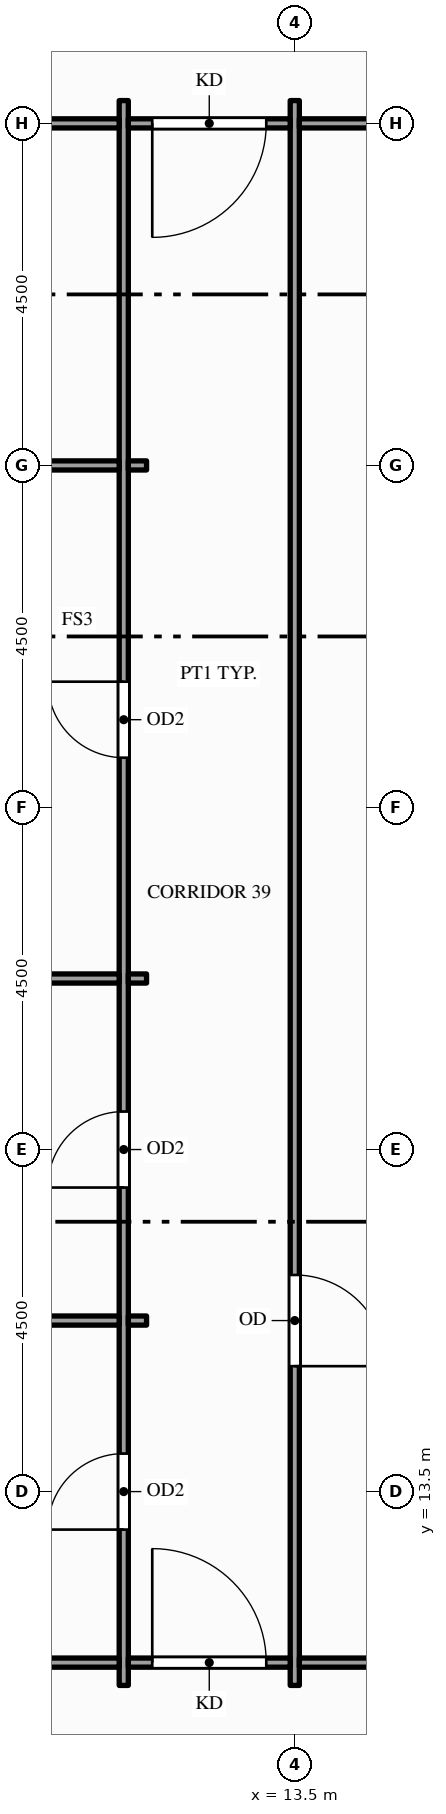
"""IFC4 building model, lengths in metres.
Left out: names, types, materials, properties, quantities, classifications, styles, units other than length and angle.
Written with IfcOpenShell. Run it as: python <this file> out.ifc"""

import sys

from ifc_helpers import new_model, si_unit, direction, frame, frame_2d, origin, place, context, subcontext, project, spatial, rectangle, extrude, element, fill, save


model = new_model("IFC4")
c1 = context("Model", 3, precision=1e-05, world=origin(), true_north=direction((0.0, 1.0)))
c2 = subcontext(c1, "Body", "Model", "MODEL_VIEW")
j1 = project(units=[si_unit("LENGTHUNIT", "METRE"), si_unit("PLANEANGLEUNIT", "RADIAN")], contexts=[c1])
p1 = place(None, origin())
s1 = spatial("IfcSite", under=j1, at=p1, CompositionType="ELEMENT")
p2 = place(p1, origin())
s2 = spatial("IfcBuilding", under=s1, at=p2, CompositionType="ELEMENT")
p3 = place(p2, frame((0.0, 0.0, 183.0)))
s3 = spatial("IfcBuildingStorey", under=s2, at=p3, CompositionType="ELEMENT", Elevation=183.0)
p4 = place(p3, frame((11.25, 10.95, 0.0), z_axis=(0.0, 0.0, 1.0), x_axis=(0.0, 1.0, 0.0)))
e1 = element("IfcWall", 1, at=p4, inside=s3, PredefinedType="PARTITIONING", context=c2, shape_type="SweptSolid", body=[
    extrude(rectangle(XDim=20.85, YDim=0.12, at=frame_2d((10.425, 0.0))), origin(), (0.0, 0.0, 1.0), 2.5),
])
p5 = place(p4, frame((2.05, 0.0, 0.0)))
e2 = element("IfcOpeningElement", 2, at=p5, cuts=e1, PredefinedType="OPENING", context=c2, shape_type="SweptSolid", body=[
    extrude(rectangle(XDim=1.0, YDim=2.1, at=frame_2d((0.5, 1.05))), frame((0.0, 0.07, 0.0), z_axis=(0.0, -1.0, 0.0), x_axis=(1.0, 0.0, 0.0)), (0.0, 0.0, 1.0), 0.14),
])
p6 = place(p4, frame((6.55, 0.0, 0.0)))
e3 = element("IfcOpeningElement", 3, at=p6, cuts=e1, PredefinedType="OPENING", context=c2, shape_type="SweptSolid", body=[
    extrude(rectangle(XDim=1.0, YDim=2.1, at=frame_2d((0.5, 1.05))), frame((0.0, 0.07, 0.0), z_axis=(0.0, -1.0, 0.0), x_axis=(1.0, 0.0, 0.0)), (0.0, 0.0, 1.0), 0.14),
])
p7 = place(p4, frame((12.205, 0.0, 0.0)))
e4 = element("IfcOpeningElement", 4, at=p7, cuts=e1, PredefinedType="OPENING", context=c2, shape_type="SweptSolid", body=[
    extrude(rectangle(XDim=1.0, YDim=2.1, at=frame_2d((0.5, 1.05))), frame((0.0, 0.07, 0.0), z_axis=(0.0, -1.0, 0.0), x_axis=(1.0, 0.0, 0.0)), (0.0, 0.0, 1.0), 0.14),
])
p8 = place(p3, frame((13.5, 10.95, 0.0), z_axis=(0.0, 0.0, 1.0), x_axis=(0.0, 1.0, 0.0)))
e5 = element("IfcWall", 5, at=p8, inside=s3, PredefinedType="PARTITIONING", context=c2, shape_type="SweptSolid", body=[
    extrude(rectangle(XDim=20.85, YDim=0.12, at=frame_2d((10.425, 0.0))), origin(), (0.0, 0.0, 1.0), 2.5),
])
p9 = place(p8, frame((4.2, 0.0, 0.0)))
e6 = element("IfcOpeningElement", 6, at=p9, cuts=e5, PredefinedType="OPENING", context=c2, shape_type="SweptSolid", body=[
    extrude(rectangle(XDim=1.2, YDim=2.1, at=frame_2d((0.6, 1.05))), frame((0.0, 0.07, 0.0), z_axis=(0.0, -1.0, 0.0), x_axis=(1.0, 0.0, 0.0)), (0.0, 0.0, 1.0), 0.14),
])
p10 = place(p3, frame((0.15, 11.25, 0.0), z_axis=(0.0, 0.0, 1.0), x_axis=(1.0, 0.0, 0.0)))
e7 = element("IfcWall", 7, at=p10, inside=s3, PredefinedType="PARTITIONING", context=c2, shape_type="SweptSolid", body=[
    extrude(rectangle(XDim=11.04, YDim=0.12, at=frame_2d((5.52, 0.0))), origin(), (0.0, 0.0, 1.0), 2.77),
])
p11 = place(p3, frame((11.31, 11.25, 0.0), z_axis=(0.0, 0.0, 1.0), x_axis=(1.0, 0.0, 0.0)))
e8 = element("IfcWall", 8, at=p11, inside=s3, PredefinedType="PARTITIONING", context=c2, shape_type="SweptSolid", body=[
    extrude(rectangle(XDim=2.13, YDim=0.12, at=frame_2d((1.065, 0.0))), origin(), (0.0, 0.0, 1.0), 2.77),
])
p12 = place(p11, frame((0.315, 0.0, 0.0)))
e9 = element("IfcOpeningElement", 9, at=p12, cuts=e8, PredefinedType="OPENING", context=c2, shape_type="SweptSolid", body=[
    extrude(rectangle(XDim=1.5, YDim=2.1, at=frame_2d((0.75, 1.05))), frame((0.0, 0.07, 0.0), z_axis=(0.0, -1.0, 0.0), x_axis=(1.0, 0.0, 0.0)), (0.0, 0.0, 1.0), 0.14),
])
p13 = place(p3, frame((13.56, 11.25, 0.0), z_axis=(0.0, 0.0, 1.0), x_axis=(1.0, 0.0, 0.0)))
e10 = element("IfcWall", 10, at=p13, inside=s3, PredefinedType="PARTITIONING", context=c2, shape_type="SweptSolid", body=[
    extrude(rectangle(XDim=13.38, YDim=0.12, at=frame_2d((6.69, 0.0))), origin(), (0.0, 0.0, 1.0), 2.77),
])
p14 = place(p13, frame((3.54, 0.0, 0.0)))
e11 = element("IfcOpeningElement", 11, at=p14, cuts=e10, PredefinedType="OPENING", context=c2, shape_type="SweptSolid", body=[
    extrude(rectangle(XDim=1.8, YDim=2.1, at=frame_2d((0.9, 1.05))), frame((0.0, 0.07, 0.0), z_axis=(0.0, -1.0, 0.0), x_axis=(1.0, 0.0, 0.0)), (0.0, 0.0, 1.0), 0.14),
])
p15 = place(p3, frame((0.15, 15.75, 0.0), z_axis=(0.0, 0.0, 1.0), x_axis=(1.0, 0.0, 0.0)))
e12 = element("IfcWall", 12, at=p15, inside=s3, PredefinedType="PARTITIONING", context=c2, shape_type="SweptSolid", body=[
    extrude(rectangle(XDim=11.04, YDim=0.12, at=frame_2d((5.52, 0.0))), origin(), (0.0, 0.0, 1.0), 2.77),
])
p16 = place(p3, frame((11.31, 15.75, 0.0), z_axis=(0.0, 0.0, 1.0), x_axis=(1.0, 0.0, 0.0)))
e13 = element("IfcWall", 13, at=p16, inside=s3, PredefinedType="PARTITIONING", context=c2, shape_type="SweptSolid", body=[
    extrude(rectangle(XDim=0.24, YDim=0.12, at=frame_2d((0.12, 0.0))), origin(), (0.0, 0.0, 1.0), 2.77),
])
p17 = place(p3, frame((0.15, 20.25, 0.0), z_axis=(0.0, 0.0, 1.0), x_axis=(1.0, 0.0, 0.0)))
e14 = element("IfcWall", 14, at=p17, inside=s3, PredefinedType="PARTITIONING", context=c2, shape_type="SweptSolid", body=[
    extrude(rectangle(XDim=11.04, YDim=0.12, at=frame_2d((5.52, 0.0))), origin(), (0.0, 0.0, 1.0), 2.77),
])
p18 = place(p3, frame((11.31, 20.25, 0.0), z_axis=(0.0, 0.0, 1.0), x_axis=(1.0, 0.0, 0.0)))
e15 = element("IfcWall", 15, at=p18, inside=s3, PredefinedType="PARTITIONING", context=c2, shape_type="SweptSolid", body=[
    extrude(rectangle(XDim=0.24, YDim=0.12, at=frame_2d((0.12, 0.0))), origin(), (0.0, 0.0, 1.0), 2.77),
])
p19 = place(p3, frame((7.06, 27.0, 0.0), z_axis=(0.0, 0.0, 1.0), x_axis=(1.0, 0.0, 0.0)))
e16 = element("IfcWall", 16, at=p19, inside=s3, PredefinedType="PARTITIONING", context=c2, shape_type="SweptSolid", body=[
    extrude(rectangle(XDim=4.13, YDim=0.12, at=frame_2d((2.065, 0.0))), origin(), (0.0, 0.0, 1.0), 2.77),
])
p20 = place(p3, frame((11.31, 27.0, 0.0), z_axis=(0.0, 0.0, 1.0), x_axis=(1.0, 0.0, 0.0)))
e17 = element("IfcWall", 17, at=p20, inside=s3, PredefinedType="PARTITIONING", context=c2, shape_type="SweptSolid", body=[
    extrude(rectangle(XDim=0.24, YDim=0.12, at=frame_2d((0.12, 0.0))), origin(), (0.0, 0.0, 1.0), 2.77),
])
p21 = place(p3, frame((7.06, 31.5, 0.0), z_axis=(0.0, 0.0, 1.0), x_axis=(1.0, 0.0, 0.0)))
e18 = element("IfcWall", 18, at=p21, inside=s3, PredefinedType="PARTITIONING", context=c2, shape_type="SweptSolid", body=[
    extrude(rectangle(XDim=4.13, YDim=0.12, at=frame_2d((2.065, 0.0))), origin(), (0.0, 0.0, 1.0), 2.77),
])
p22 = place(p21, frame((1.565, 0.0, 0.0)))
e19 = element("IfcOpeningElement", 19, at=p22, cuts=e18, PredefinedType="OPENING", context=c2, shape_type="SweptSolid", body=[
    extrude(rectangle(XDim=1.0, YDim=2.1, at=frame_2d((0.5, 1.05))), frame((0.0, 0.07, 0.0), z_axis=(0.0, -1.0, 0.0), x_axis=(1.0, 0.0, 0.0)), (0.0, 0.0, 1.0), 0.14),
])
p23 = place(p3, frame((11.31, 31.5, 0.0), z_axis=(0.0, 0.0, 1.0), x_axis=(1.0, 0.0, 0.0)))
e20 = element("IfcWall", 20, at=p23, inside=s3, PredefinedType="PARTITIONING", context=c2, shape_type="SweptSolid", body=[
    extrude(rectangle(XDim=2.13, YDim=0.12, at=frame_2d((1.065, 0.0))), origin(), (0.0, 0.0, 1.0), 2.77),
])
p24 = place(p23, frame((0.315, 0.0, 0.0)))
e21 = element("IfcOpeningElement", 21, at=p24, cuts=e20, PredefinedType="OPENING", context=c2, shape_type="SweptSolid", body=[
    extrude(rectangle(XDim=1.5, YDim=2.1, at=frame_2d((0.75, 1.05))), frame((0.0, 0.07, 0.0), z_axis=(0.0, -1.0, 0.0), x_axis=(1.0, 0.0, 0.0)), (0.0, 0.0, 1.0), 0.14),
])
p25 = place(p3, frame((13.56, 31.5, 0.0), z_axis=(0.0, 0.0, 1.0), x_axis=(1.0, 0.0, 0.0)))
e22 = element("IfcWall", 22, at=p25, inside=s3, PredefinedType="PARTITIONING", context=c2, shape_type="SweptSolid", body=[
    extrude(rectangle(XDim=7.29, YDim=0.12, at=frame_2d((3.645, 0.0))), origin(), (0.0, 0.0, 1.0), 2.77),
])
p26 = place(p12, origin())
e23 = element("IfcDoor", 23, at=p26, inside=s3, OperationType="SINGLE_SWING_LEFT", PredefinedType="DOOR", context=c2, shape_type="SweptSolid", body=[
    extrude(rectangle(XDim=1.5, YDim=2.1, at=frame_2d((0.75, 1.05))), frame((0.0, 0.025, 0.0), z_axis=(0.0, -1.0, 0.0), x_axis=(1.0, 0.0, 0.0)), (0.0, 0.0, 1.0), 0.05),
])
fill(e9, e23)
p27 = place(p24, origin())
e24 = element("IfcDoor", 24, at=p27, inside=s3, OperationType="SINGLE_SWING_LEFT", PredefinedType="DOOR", context=c2, shape_type="SweptSolid", body=[
    extrude(rectangle(XDim=1.5, YDim=2.1, at=frame_2d((0.75, 1.05))), frame((0.0, 0.025, 0.0), z_axis=(0.0, -1.0, 0.0), x_axis=(1.0, 0.0, 0.0)), (0.0, 0.0, 1.0), 0.05),
])
fill(e21, e24)
p28 = place(p5, origin())
e25 = element("IfcDoor", 25, at=p28, inside=s3, OperationType="SINGLE_SWING_LEFT", PredefinedType="DOOR", context=c2, shape_type="SweptSolid", body=[
    extrude(rectangle(XDim=1.0, YDim=2.1, at=frame_2d((0.5, 1.05))), frame((0.0, 0.025, 0.0), z_axis=(0.0, -1.0, 0.0), x_axis=(1.0, 0.0, 0.0)), (0.0, 0.0, 1.0), 0.05),
])
fill(e2, e25)
p29 = place(p6, origin())
e26 = element("IfcDoor", 26, at=p29, inside=s3, OperationType="SINGLE_SWING_LEFT", PredefinedType="DOOR", context=c2, shape_type="SweptSolid", body=[
    extrude(rectangle(XDim=1.0, YDim=2.1, at=frame_2d((0.5, 1.05))), frame((0.0, 0.025, 0.0), z_axis=(0.0, -1.0, 0.0), x_axis=(1.0, 0.0, 0.0)), (0.0, 0.0, 1.0), 0.05),
])
fill(e3, e26)
p30 = place(p7, origin())
e27 = element("IfcDoor", 27, at=p30, inside=s3, OperationType="SINGLE_SWING_RIGHT", PredefinedType="DOOR", context=c2, shape_type="SweptSolid", body=[
    extrude(rectangle(XDim=1.0, YDim=2.1, at=frame_2d((0.5, 1.05))), frame((0.0, 0.025, 0.0), z_axis=(0.0, -1.0, 0.0), x_axis=(1.0, 0.0, 0.0)), (0.0, 0.0, 1.0), 0.05),
])
fill(e4, e27)
p31 = place(p9, origin())
e28 = element("IfcDoor", 28, at=p31, inside=s3, OperationType="SINGLE_SWING_LEFT", PredefinedType="DOOR", context=c2, shape_type="SweptSolid", body=[
    extrude(rectangle(XDim=1.2, YDim=2.1, at=frame_2d((0.6, 1.05))), frame((0.0, 0.025, 0.0), z_axis=(0.0, -1.0, 0.0), x_axis=(1.0, 0.0, 0.0)), (0.0, 0.0, 1.0), 0.05),
])
fill(e6, e28)
save(model, sys.argv[1])
